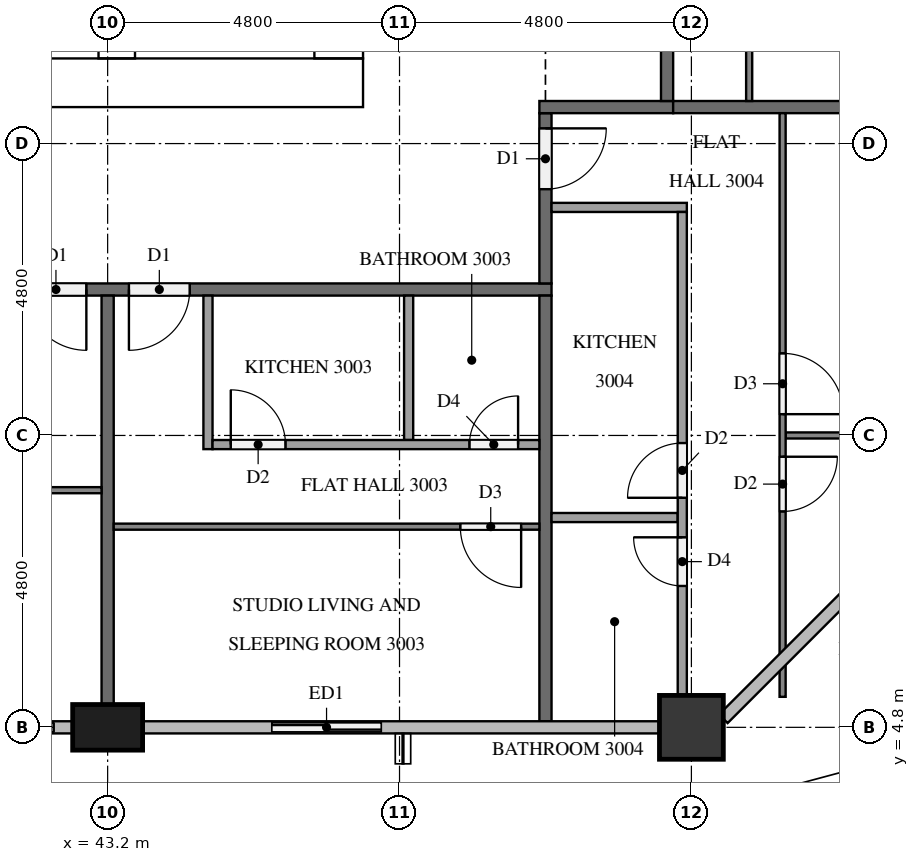
"""IFC4 building model, lengths in metres.
Left out: names, types, materials, properties, quantities, classifications, styles, units other than length and angle.
Written with IfcOpenShell. Run it as: python <this file> out.ifc"""

import sys

from ifc_helpers import new_model, si_unit, direction, frame, frame_2d, origin, origin_2d, place, context, subcontext, project, spatial, rectangle, extrude, element, fill, save


model = new_model("IFC4")
c1 = context("Model", 3, precision=1e-05, world=origin(), true_north=direction((0.0, 1.0)))
c2 = subcontext(c1, "Body", "Model", "MODEL_VIEW")
j1 = project(units=[si_unit("LENGTHUNIT", "METRE"), si_unit("PLANEANGLEUNIT", "RADIAN")], contexts=[c1])
p1 = place(None, origin())
s1 = spatial("IfcSite", under=j1, at=p1, CompositionType="ELEMENT")
p2 = place(p1, origin())
s2 = spatial("IfcBuilding", under=s1, at=p2, CompositionType="ELEMENT")
p3 = place(p2, frame((0.0, 0.0, 119.1)))
s3 = spatial("IfcBuildingStorey", under=s2, at=p3, CompositionType="ELEMENT", Elevation=119.1)
p4 = place(p3, frame((15.0, 15.4, 0.0), z_axis=(0.0, 0.0, 1.0), x_axis=(1.0, 0.0, 0.0)))
e1 = element("IfcWall", 1, at=p4, inside=s3, PredefinedType="SHEAR", context=c2, shape_type="SweptSolid", body=[
    extrude(rectangle(XDim=32.4, YDim=0.8, at=frame_2d((16.2, 0.0))), origin(), (0.0, 0.0, 1.0), 3.2),
])
p5 = place(p4, frame((15.3, 0.0, 0.0)))
e2 = element("IfcOpeningElement", 2, at=p5, cuts=e1, PredefinedType="OPENING", context=c2, shape_type="SweptSolid", body=[
    extrude(rectangle(XDim=1.8, YDim=2.1, at=frame_2d((0.9, 1.05))), frame((0.0, 0.41, 0.0), z_axis=(0.0, -1.0, 0.0), x_axis=(1.0, 0.0, 0.0)), (0.0, 0.0, 1.0), 0.82),
])
p6 = place(p3, frame((47.0, 15.8, 0.0), z_axis=(0.0, 0.0, 1.0), x_axis=(0.0, 1.0, 0.0)))
e3 = element("IfcWall", 3, at=p6, inside=s3, PredefinedType="SHEAR", context=c2, shape_type="SweptSolid", body=[
    extrude(rectangle(XDim=21.2, YDim=0.8, at=frame_2d((10.6, 0.0))), origin(), (0.0, 0.0, 1.0), 3.2),
])
p7 = place(p6, frame((10.3, 0.0, 0.0)))
e4 = element("IfcOpeningElement", 4, at=p7, cuts=e3, PredefinedType="OPENING", context=c2, shape_type="SweptSolid", body=[
    extrude(rectangle(XDim=1.2, YDim=2.1, at=frame_2d((0.6, 1.05))), frame((0.0, 0.41, 0.0), z_axis=(0.0, -1.0, 0.0), x_axis=(1.0, 0.0, 0.0)), (0.0, 0.0, 1.0), 0.82),
])
p8 = place(p3, frame((43.35, 15.8, 0.0), z_axis=(0.0, 0.0, 1.0), x_axis=(0.0, 1.0, 0.0)))
e5 = element("IfcWall", 5, at=p8, inside=s3, PredefinedType="SHEAR", context=c2, shape_type="SweptSolid", body=[
    extrude(rectangle(XDim=8.45, YDim=0.6, at=frame_2d((4.225, 0.0))), origin(), (0.0, 0.0, 1.0), 3.2),
])
p9 = place(p8, frame((0.4, 0.0, 0.0)))
e6 = element("IfcOpeningElement", 6, at=p9, cuts=e5, PredefinedType="OPENING", context=c2, shape_type="SweptSolid", body=[
    extrude(rectangle(XDim=1.2, YDim=2.1, at=frame_2d((0.6, 1.05))), frame((0.0, 0.31, 0.0), z_axis=(0.0, -1.0, 0.0), x_axis=(1.0, 0.0, 0.0)), (0.0, 0.0, 1.0), 0.62),
])
p10 = place(p3, frame((43.2, 4.8, 0.0), z_axis=(0.0, 0.0, 1.0), x_axis=(1.0, 0.0, 0.0)))
e7 = element("IfcColumn", 7, at=p10, inside=s3, PredefinedType="COLUMN", context=c2, shape_type="SweptSolid", body=[
    extrude(rectangle(XDim=1.15, YDim=0.75, at=origin_2d()), origin(), (0.0, 0.0, 1.0), 3.2),
])
p11 = place(p3, frame((52.8, 4.8, 0.0), z_axis=(0.0, 0.0, 1.0), x_axis=(1.0, 0.0, 0.0)))
e8 = element("IfcColumn", 8, at=p11, inside=s3, PredefinedType="COLUMN", context=c2, shape_type="SweptSolid", body=[
    extrude(rectangle(XDim=1.05, YDim=1.05, at=origin_2d()), origin(), (0.0, 0.0, 1.0), 3.2),
])
p12 = place(p3, frame((40.8, 4.8, 0.0), z_axis=(0.0, 0.0, 1.0), x_axis=(1.0, 0.0, 0.0)))
e9 = element("IfcWall", 9, at=p12, inside=s3, PredefinedType="SOLIDWALL", context=c2, shape_type="SweptSolid", body=[
    extrude(rectangle(XDim=1.825, YDim=0.15, at=frame_2d((0.913, 0.0))), origin(), (0.0, 0.0, 1.0), 3.2),
])
p13 = place(p12, frame((0.312, 0.0, 0.9)))
e10 = element("IfcOpeningElement", 10, at=p13, cuts=e9, PredefinedType="OPENING", context=c2, shape_type="SweptSolid", body=[
    extrude(rectangle(XDim=1.2, YDim=1.4, at=frame_2d((0.6, 0.7))), frame((0.0, 0.085, 0.0), z_axis=(0.0, -1.0, 0.0), x_axis=(1.0, 0.0, 0.0)), (0.0, 0.0, 1.0), 0.17),
])
p14 = place(p3, frame((45.6, 4.8, 0.0), z_axis=(0.0, 0.0, 1.0), x_axis=(1.0, 0.0, 0.0)))
e11 = element("IfcWall", 11, at=p14, inside=s3, PredefinedType="SOLIDWALL", context=c2, shape_type="SweptSolid", body=[
    extrude(rectangle(XDim=2.4, YDim=0.15, at=frame_2d((1.2, 0.0))), origin(), (0.0, 0.0, 1.0), 3.2),
])
p15 = place(p14, frame((0.3, 0.0, 0.0)))
e12 = element("IfcOpeningElement", 12, at=p15, cuts=e11, PredefinedType="OPENING", context=c2, shape_type="SweptSolid", body=[
    extrude(rectangle(XDim=1.8, YDim=2.4, at=frame_2d((0.9, 1.2))), frame((0.0, 0.085, 0.0), z_axis=(0.0, -1.0, 0.0), x_axis=(1.0, 0.0, 0.0)), (0.0, 0.0, 1.0), 0.17),
])
p16 = place(p3, frame((50.5, 12.0, 0.0), z_axis=(0.0, 0.0, 1.0), x_axis=(-1.0, 0.0, 0.0)))
e13 = element("IfcWall", 13, at=p16, inside=s3, PredefinedType="PARTITIONING", context=c2, shape_type="SweptSolid", body=[
    extrude(rectangle(XDim=38.6, YDim=0.2, at=frame_2d((19.3, 0.0))), origin(), (0.0, 0.0, 1.0), 3.2),
])
p17 = place(p16, frame((37.15, 0.0, 0.0)))
e14 = element("IfcOpeningElement", 14, at=p17, cuts=e13, PredefinedType="OPENING", context=c2, shape_type="SweptSolid", body=[
    extrude(rectangle(XDim=1.0, YDim=2.1, at=frame_2d((0.5, 1.05))), frame((0.0, 0.11, 0.0), z_axis=(0.0, -1.0, 0.0), x_axis=(1.0, 0.0, 0.0)), (0.0, 0.0, 1.0), 0.22),
])
p18 = place(p16, frame((7.65, 0.0, 0.0)))
e15 = element("IfcOpeningElement", 15, at=p18, cuts=e13, PredefinedType="OPENING", context=c2, shape_type="SweptSolid", body=[
    extrude(rectangle(XDim=1.0, YDim=2.1, at=frame_2d((0.5, 1.05))), frame((0.0, 0.11, 0.0), z_axis=(0.0, -1.0, 0.0), x_axis=(1.0, 0.0, 0.0)), (0.0, 0.0, 1.0), 0.22),
])
p19 = place(p16, frame((5.95, 0.0, 0.0)))
e16 = element("IfcOpeningElement", 16, at=p19, cuts=e13, PredefinedType="OPENING", context=c2, shape_type="SweptSolid", body=[
    extrude(rectangle(XDim=1.0, YDim=2.1, at=frame_2d((0.5, 1.05))), frame((0.0, 0.11, 0.0), z_axis=(0.0, -1.0, 0.0), x_axis=(1.0, 0.0, 0.0)), (0.0, 0.0, 1.0), 0.22),
])
p20 = place(p3, frame((50.4, 14.9, 0.0), z_axis=(0.0, 0.0, 1.0), x_axis=(0.0, -1.0, 0.0)))
e17 = element("IfcWall", 17, at=p20, inside=s3, PredefinedType="PARTITIONING", context=c2, shape_type="SweptSolid", body=[
    extrude(rectangle(XDim=2.8, YDim=0.2, at=frame_2d((1.4, 0.0))), origin(), (0.0, 0.0, 1.0), 3.2),
])
p21 = place(p20, frame((0.25, 0.0, 0.0)))
e18 = element("IfcOpeningElement", 18, at=p21, cuts=e17, PredefinedType="OPENING", context=c2, shape_type="SweptSolid", body=[
    extrude(rectangle(XDim=1.0, YDim=2.1, at=frame_2d((0.5, 1.05))), frame((0.0, 0.11, 0.0), z_axis=(0.0, -1.0, 0.0), x_axis=(1.0, 0.0, 0.0)), (0.0, 0.0, 1.0), 0.22),
])
p22 = place(p3, frame((50.3, 15.0, 0.0), z_axis=(0.0, 0.0, 1.0), x_axis=(1.0, 0.0, 0.0)))
e19 = element("IfcWall", 19, at=p22, inside=s3, PredefinedType="PARTITIONING", context=c2, shape_type="SweptSolid", body=[
    extrude(rectangle(XDim=2.2, YDim=0.2, at=frame_2d((1.1, 0.0))), origin(), (0.0, 0.0, 1.0), 3.2),
])
p23 = place(p3, frame((52.4, 37.7, 0.0), z_axis=(0.0, 0.0, 1.0), x_axis=(0.0, -1.0, 0.0)))
e20 = element("IfcWall", 20, at=p23, inside=s3, PredefinedType="PARTITIONING", context=c2, shape_type="SweptSolid", body=[
    extrude(rectangle(XDim=22.6, YDim=0.2, at=frame_2d((11.3, 0.0))), origin(), (0.0, 0.0, 1.0), 3.2),
])
p24 = place(p23, frame((0.25, 0.0, 0.0)))
e21 = element("IfcOpeningElement", 21, at=p24, cuts=e20, PredefinedType="OPENING", context=c2, shape_type="SweptSolid", body=[
    extrude(rectangle(XDim=1.0, YDim=2.1, at=frame_2d((0.5, 1.05))), frame((0.0, 0.11, 0.0), z_axis=(0.0, -1.0, 0.0), x_axis=(1.0, 0.0, 0.0)), (0.0, 0.0, 1.0), 0.22),
])
p25 = place(p3, frame((43.2, 11.9, 0.0), z_axis=(0.0, 0.0, 1.0), x_axis=(0.0, -1.0, 0.0)))
e22 = element("IfcWall", 22, at=p25, inside=s3, PredefinedType="PARTITIONING", context=c2, shape_type="SweptSolid", body=[
    extrude(rectangle(XDim=6.725, YDim=0.2, at=frame_2d((3.362, 0.0))), origin(), (0.0, 0.0, 1.0), 3.2),
])
p26 = place(p3, frame((50.4, 11.9, 0.0), z_axis=(0.0, 0.0, 1.0), x_axis=(0.0, -1.0, 0.0)))
e23 = element("IfcWall", 23, at=p26, inside=s3, PredefinedType="PARTITIONING", context=c2, shape_type="SweptSolid", body=[
    extrude(rectangle(XDim=7.0, YDim=0.2, at=frame_2d((3.5, 0.0))), origin(), (0.0, 0.0, 1.0), 3.2),
])
p27 = place(p3, frame((52.5, 15.0, 0.0), z_axis=(0.0, 0.0, 1.0), x_axis=(1.0, 0.0, 0.0)))
e24 = element("IfcWall", 24, at=p27, inside=s3, PredefinedType="PARTITIONING", context=c2, shape_type="SweptSolid", body=[
    extrude(rectangle(XDim=5.0, YDim=0.2, at=frame_2d((2.5, 0.0))), origin(), (0.0, 0.0, 1.0), 3.2),
])
p28 = place(p3, frame((43.1, 8.7, 0.0), z_axis=(0.0, 0.0, 1.0), x_axis=(-1.0, 0.0, 0.0)))
e25 = element("IfcWall", 25, at=p28, inside=s3, PredefinedType="PARTITIONING", context=c2, shape_type="SweptSolid", body=[
    extrude(rectangle(XDim=16.6, YDim=0.1, at=frame_2d((8.3, 0.0))), origin(), (0.0, 0.0, 1.0), 3.2),
])
p29 = place(p28, frame((3.45, 0.0, 0.0)))
e26 = element("IfcOpeningElement", 26, at=p29, cuts=e25, PredefinedType="OPENING", context=c2, shape_type="SweptSolid", body=[
    extrude(rectangle(XDim=0.9, YDim=2.1, at=frame_2d((0.45, 1.05))), frame((0.0, 0.06, 0.0), z_axis=(0.0, -1.0, 0.0), x_axis=(1.0, 0.0, 0.0)), (0.0, 0.0, 1.0), 0.12),
])
p30 = place(p28, frame((5.05, 0.0, 0.0)))
e27 = element("IfcOpeningElement", 27, at=p30, cuts=e25, PredefinedType="OPENING", context=c2, shape_type="SweptSolid", body=[
    extrude(rectangle(XDim=1.0, YDim=2.1, at=frame_2d((0.5, 1.05))), frame((0.0, 0.06, 0.0), z_axis=(0.0, -1.0, 0.0), x_axis=(1.0, 0.0, 0.0)), (0.0, 0.0, 1.0), 0.12),
])
p31 = place(p28, frame((15.4, 0.0, 0.0)))
e28 = element("IfcOpeningElement", 28, at=p31, cuts=e25, PredefinedType="OPENING", context=c2, shape_type="SweptSolid", body=[
    extrude(rectangle(XDim=0.9, YDim=2.1, at=frame_2d((0.45, 1.05))), frame((0.0, 0.06, 0.0), z_axis=(0.0, -1.0, 0.0), x_axis=(1.0, 0.0, 0.0)), (0.0, 0.0, 1.0), 0.12),
])
p32 = place(p3, frame((50.3, 8.1, 0.0), z_axis=(0.0, 0.0, 1.0), x_axis=(-1.0, 0.0, 0.0)))
e29 = element("IfcWall", 29, at=p32, inside=s3, PredefinedType="PARTITIONING", context=c2, shape_type="SweptSolid", body=[
    extrude(rectangle(XDim=7.0, YDim=0.1, at=frame_2d((3.5, 0.0))), origin(), (0.0, 0.0, 1.0), 3.2),
])
p33 = place(p32, frame((0.3, 0.0, 0.0)))
e30 = element("IfcOpeningElement", 30, at=p33, cuts=e29, PredefinedType="OPENING", context=c2, shape_type="SweptSolid", body=[
    extrude(rectangle(XDim=1.0, YDim=2.1, at=frame_2d((0.5, 1.05))), frame((0.0, 0.06, 0.0), z_axis=(0.0, -1.0, 0.0), x_axis=(1.0, 0.0, 0.0)), (0.0, 0.0, 1.0), 0.12),
])
p34 = place(p3, frame((48.15, 11.9, 0.0), z_axis=(0.0, 0.0, 1.0), x_axis=(0.0, -1.0, 0.0)))
e31 = element("IfcWall", 31, at=p34, inside=s3, PredefinedType="PARTITIONING", context=c2, shape_type="SweptSolid", body=[
    extrude(rectangle(XDim=2.375, YDim=0.15, at=frame_2d((1.188, 0.0))), origin(), (0.0, 0.0, 1.0), 3.2),
])
p35 = place(p3, frame((44.85, 11.9, 0.0), z_axis=(0.0, 0.0, 1.0), x_axis=(0.0, -1.0, 0.0)))
e32 = element("IfcWall", 32, at=p35, inside=s3, PredefinedType="PARTITIONING", context=c2, shape_type="SweptSolid", body=[
    extrude(rectangle(XDim=2.525, YDim=0.15, at=frame_2d((1.262, 0.0))), origin(), (0.0, 0.0, 1.0), 3.2),
])
p36 = place(p3, frame((44.925, 9.45, 0.0), z_axis=(0.0, 0.0, 1.0), x_axis=(1.0, 0.0, 0.0)))
e33 = element("IfcWall", 33, at=p36, inside=s3, PredefinedType="PARTITIONING", context=c2, shape_type="SweptSolid", body=[
    extrude(rectangle(XDim=5.375, YDim=0.15, at=frame_2d((2.688, 0.0))), origin(), (0.0, 0.0, 1.0), 3.2),
])
p37 = place(p36, frame((0.3, 0.0, 0.0)))
e34 = element("IfcOpeningElement", 34, at=p37, cuts=e33, PredefinedType="OPENING", context=c2, shape_type="SweptSolid", body=[
    extrude(rectangle(XDim=0.9, YDim=2.1, at=frame_2d((0.45, 1.05))), frame((0.0, 0.085, 0.0), z_axis=(0.0, -1.0, 0.0), x_axis=(1.0, 0.0, 0.0)), (0.0, 0.0, 1.0), 0.17),
])
p38 = place(p36, frame((4.225, 0.0, 0.0)))
e35 = element("IfcOpeningElement", 35, at=p38, cuts=e33, PredefinedType="OPENING", context=c2, shape_type="SweptSolid", body=[
    extrude(rectangle(XDim=0.8, YDim=2.1, at=frame_2d((0.4, 1.05))), frame((0.0, 0.085, 0.0), z_axis=(0.0, -1.0, 0.0), x_axis=(1.0, 0.0, 0.0)), (0.0, 0.0, 1.0), 0.17),
])
p39 = place(p3, frame((54.35, 9.6, 0.0), z_axis=(0.0, 0.0, 1.0), x_axis=(1.0, 0.0, 0.0)))
e36 = element("IfcWall", 36, at=p39, inside=s3, PredefinedType="PARTITIONING", context=c2, shape_type="SweptSolid", body=[
    extrude(rectangle(XDim=2.725, YDim=0.1, at=frame_2d((1.362, 0.0))), origin(), (0.0, 0.0, 1.0), 3.2),
])
p40 = place(p3, frame((54.3, 14.9, 0.0), z_axis=(0.0, 0.0, 1.0), x_axis=(0.0, -1.0, 0.0)))
e37 = element("IfcWall", 37, at=p40, inside=s3, PredefinedType="PARTITIONING", context=c2, shape_type="SweptSolid", body=[
    extrude(rectangle(XDim=9.598, YDim=0.1, at=frame_2d((4.799, 0.0))), origin(), (0.0, 0.0, 1.0), 3.2),
])
p41 = place(p40, frame((3.95, 0.0, 0.0)))
e38 = element("IfcOpeningElement", 38, at=p41, cuts=e37, PredefinedType="OPENING", context=c2, shape_type="SweptSolid", body=[
    extrude(rectangle(XDim=1.0, YDim=2.1, at=frame_2d((0.5, 1.05))), frame((0.0, 0.06, 0.0), z_axis=(0.0, -1.0, 0.0), x_axis=(1.0, 0.0, 0.0)), (0.0, 0.0, 1.0), 0.12),
])
p42 = place(p40, frame((5.65, 0.0, 0.0)))
e39 = element("IfcOpeningElement", 39, at=p42, cuts=e37, PredefinedType="OPENING", context=c2, shape_type="SweptSolid", body=[
    extrude(rectangle(XDim=0.9, YDim=2.1, at=frame_2d((0.45, 1.05))), frame((0.0, 0.06, 0.0), z_axis=(0.0, -1.0, 0.0), x_axis=(1.0, 0.0, 0.0)), (0.0, 0.0, 1.0), 0.12),
])
p43 = place(p3, frame((50.5, 8.25, 0.0), z_axis=(0.0, 0.0, 1.0), x_axis=(1.0, 0.0, 0.0)))
e40 = element("IfcWall", 40, at=p43, inside=s3, PredefinedType="PARTITIONING", context=c2, shape_type="SweptSolid", body=[
    extrude(rectangle(XDim=2.075, YDim=0.15, at=frame_2d((1.038, 0.0))), origin(), (0.0, 0.0, 1.0), 3.2),
])
p44 = place(p3, frame((50.5, 13.35, 0.0), z_axis=(0.0, 0.0, 1.0), x_axis=(1.0, 0.0, 0.0)))
e41 = element("IfcWall", 41, at=p44, inside=s3, PredefinedType="PARTITIONING", context=c2, shape_type="SweptSolid", body=[
    extrude(rectangle(XDim=2.225, YDim=0.15, at=frame_2d((1.113, 0.0))), origin(), (0.0, 0.0, 1.0), 3.2),
])
p45 = place(p3, frame((52.65, 5.325, 0.0), z_axis=(0.0, 0.0, 1.0), x_axis=(0.0, 1.0, 0.0)))
e42 = element("IfcWall", 42, at=p45, inside=s3, PredefinedType="PARTITIONING", context=c2, shape_type="SweptSolid", body=[
    extrude(rectangle(XDim=7.95, YDim=0.15, at=frame_2d((3.975, 0.0))), origin(), (0.0, 0.0, 1.0), 3.2),
])
p46 = place(p45, frame((3.25, 0.0, 0.0)))
e43 = element("IfcOpeningElement", 43, at=p46, cuts=e42, PredefinedType="OPENING", context=c2, shape_type="SweptSolid", body=[
    extrude(rectangle(XDim=0.9, YDim=2.1, at=frame_2d((0.45, 1.05))), frame((0.0, 0.085, 0.0), z_axis=(0.0, -1.0, 0.0), x_axis=(1.0, 0.0, 0.0)), (0.0, 0.0, 1.0), 0.17),
])
p47 = place(p45, frame((1.8, 0.0, 0.0)))
e44 = element("IfcOpeningElement", 44, at=p47, cuts=e42, PredefinedType="OPENING", context=c2, shape_type="SweptSolid", body=[
    extrude(rectangle(XDim=0.8, YDim=2.1, at=frame_2d((0.4, 1.05))), frame((0.0, 0.085, 0.0), z_axis=(0.0, -1.0, 0.0), x_axis=(1.0, 0.0, 0.0)), (0.0, 0.0, 1.0), 0.17),
])
p48 = place(p3, frame((53.75, 37.7, 0.0), z_axis=(0.0, 0.0, 1.0), x_axis=(0.0, -1.0, 0.0)))
e45 = element("IfcWall", 45, at=p48, inside=s3, PredefinedType="PARTITIONING", context=c2, shape_type="SweptSolid", body=[
    extrude(rectangle(XDim=22.6, YDim=0.1, at=frame_2d((11.3, 0.0))), origin(), (0.0, 0.0, 1.0), 3.2),
])
p49 = place(p48, frame((2.85, 0.0, 0.0)))
e46 = element("IfcOpeningElement", 46, at=p49, cuts=e45, PredefinedType="OPENING", context=c2, shape_type="SweptSolid", body=[
    extrude(rectangle(XDim=0.9, YDim=2.1, at=frame_2d((0.45, 1.05))), frame((0.0, 0.06, 0.0), z_axis=(0.0, -1.0, 0.0), x_axis=(1.0, 0.0, 0.0)), (0.0, 0.0, 1.0), 0.12),
])
p50 = place(p48, frame((4.45, 0.0, 0.0)))
e47 = element("IfcOpeningElement", 47, at=p50, cuts=e45, PredefinedType="OPENING", context=c2, shape_type="SweptSolid", body=[
    extrude(rectangle(XDim=0.8, YDim=2.1, at=frame_2d((0.4, 1.05))), frame((0.0, 0.06, 0.0), z_axis=(0.0, -1.0, 0.0), x_axis=(1.0, 0.0, 0.0)), (0.0, 0.0, 1.0), 0.12),
])
p51 = place(p48, frame((7.65, 0.0, 0.0)))
e48 = element("IfcOpeningElement", 48, at=p51, cuts=e45, PredefinedType="OPENING", context=c2, shape_type="SweptSolid", body=[
    extrude(rectangle(XDim=0.9, YDim=2.1, at=frame_2d((0.45, 1.05))), frame((0.0, 0.06, 0.0), z_axis=(0.0, -1.0, 0.0), x_axis=(1.0, 0.0, 0.0)), (0.0, 0.0, 1.0), 0.12),
])
p52 = place(p48, frame((9.25, 0.0, 0.0)))
e49 = element("IfcOpeningElement", 49, at=p52, cuts=e45, PredefinedType="OPENING", context=c2, shape_type="SweptSolid", body=[
    extrude(rectangle(XDim=0.9, YDim=2.1, at=frame_2d((0.45, 1.05))), frame((0.0, 0.06, 0.0), z_axis=(0.0, -1.0, 0.0), x_axis=(1.0, 0.0, 0.0)), (0.0, 0.0, 1.0), 0.12),
])
p53 = place(p48, frame((17.15, 0.0, 0.0)))
e50 = element("IfcOpeningElement", 50, at=p53, cuts=e45, PredefinedType="OPENING", context=c2, shape_type="SweptSolid", body=[
    extrude(rectangle(XDim=1.0, YDim=2.1, at=frame_2d((0.5, 1.05))), frame((0.0, 0.06, 0.0), z_axis=(0.0, -1.0, 0.0), x_axis=(1.0, 0.0, 0.0)), (0.0, 0.0, 1.0), 0.12),
])
p54 = place(p48, frame((18.85, 0.0, 0.0)))
e51 = element("IfcOpeningElement", 51, at=p54, cuts=e45, PredefinedType="OPENING", context=c2, shape_type="SweptSolid", body=[
    extrude(rectangle(XDim=0.9, YDim=2.1, at=frame_2d((0.45, 1.05))), frame((0.0, 0.06, 0.0), z_axis=(0.0, -1.0, 0.0), x_axis=(1.0, 0.0, 0.0)), (0.0, 0.0, 1.0), 0.12),
])
p55 = place(p13, origin())
e52 = element("IfcWindow", 52, at=p55, inside=s3, PartitioningType="SINGLE_PANEL", PredefinedType="WINDOW", context=c2, shape_type="SweptSolid", body=[
    extrude(rectangle(XDim=1.2, YDim=1.4, at=frame_2d((0.6, 0.7))), frame((0.0, 0.03, 0.0), z_axis=(0.0, -1.0, 0.0), x_axis=(1.0, 0.0, 0.0)), (0.0, 0.0, 1.0), 0.06),
])
fill(e10, e52)
p56 = place(p15, origin())
e53 = element("IfcDoor", 53, at=p56, inside=s3, OperationType="SLIDING_TO_RIGHT", PredefinedType="DOOR", context=c2, shape_type="SweptSolid", body=[
    extrude(rectangle(XDim=1.8, YDim=2.4, at=frame_2d((0.9, 1.2))), frame((0.0, 0.025, 0.0), z_axis=(0.0, -1.0, 0.0), x_axis=(1.0, 0.0, 0.0)), (0.0, 0.0, 1.0), 0.05),
])
fill(e12, e53)
p57 = place(p18, origin())
e54 = element("IfcDoor", 54, at=p57, inside=s3, OperationType="SINGLE_SWING_LEFT", PredefinedType="DOOR", context=c2, shape_type="SweptSolid", body=[
    extrude(rectangle(XDim=1.0, YDim=2.1, at=frame_2d((0.5, 1.05))), frame((0.0, 0.025, 0.0), z_axis=(0.0, -1.0, 0.0), x_axis=(1.0, 0.0, 0.0)), (0.0, 0.0, 1.0), 0.05),
])
fill(e15, e54)
p58 = place(p19, origin())
e55 = element("IfcDoor", 55, at=p58, inside=s3, OperationType="SINGLE_SWING_RIGHT", PredefinedType="DOOR", context=c2, shape_type="SweptSolid", body=[
    extrude(rectangle(XDim=1.0, YDim=2.1, at=frame_2d((0.5, 1.05))), frame((0.0, 0.025, 0.0), z_axis=(0.0, -1.0, 0.0), x_axis=(1.0, 0.0, 0.0)), (0.0, 0.0, 1.0), 0.05),
])
fill(e16, e55)
p59 = place(p21, origin())
e56 = element("IfcDoor", 56, at=p59, inside=s3, OperationType="SINGLE_SWING_LEFT", PredefinedType="DOOR", context=c2, shape_type="SweptSolid", body=[
    extrude(rectangle(XDim=1.0, YDim=2.1, at=frame_2d((0.5, 1.05))), frame((0.0, 0.025, 0.0), z_axis=(0.0, -1.0, 0.0), x_axis=(1.0, 0.0, 0.0)), (0.0, 0.0, 1.0), 0.05),
])
fill(e18, e56)
p60 = place(p33, origin())
e57 = element("IfcDoor", 57, at=p60, inside=s3, OperationType="SINGLE_SWING_LEFT", PredefinedType="DOOR", context=c2, shape_type="SweptSolid", body=[
    extrude(rectangle(XDim=1.0, YDim=2.1, at=frame_2d((0.5, 1.05))), frame((0.0, 0.025, 0.0), z_axis=(0.0, -1.0, 0.0), x_axis=(1.0, 0.0, 0.0)), (0.0, 0.0, 1.0), 0.05),
])
fill(e30, e57)
p61 = place(p37, origin())
e58 = element("IfcDoor", 58, at=p61, inside=s3, OperationType="SINGLE_SWING_LEFT", PredefinedType="DOOR", context=c2, shape_type="SweptSolid", body=[
    extrude(rectangle(XDim=0.9, YDim=2.1, at=frame_2d((0.45, 1.05))), frame((0.0, 0.025, 0.0), z_axis=(0.0, -1.0, 0.0), x_axis=(1.0, 0.0, 0.0)), (0.0, 0.0, 1.0), 0.05),
])
fill(e34, e58)
p62 = place(p38, origin())
e59 = element("IfcDoor", 59, at=p62, inside=s3, OperationType="SINGLE_SWING_RIGHT", PredefinedType="DOOR", context=c2, shape_type="SweptSolid", body=[
    extrude(rectangle(XDim=0.8, YDim=2.1, at=frame_2d((0.4, 1.05))), frame((0.0, 0.025, 0.0), z_axis=(0.0, -1.0, 0.0), x_axis=(1.0, 0.0, 0.0)), (0.0, 0.0, 1.0), 0.05),
])
fill(e35, e59)
p63 = place(p41, origin())
e60 = element("IfcDoor", 60, at=p63, inside=s3, OperationType="SINGLE_SWING_RIGHT", PredefinedType="DOOR", context=c2, shape_type="SweptSolid", body=[
    extrude(rectangle(XDim=1.0, YDim=2.1, at=frame_2d((0.5, 1.05))), frame((0.0, 0.025, 0.0), z_axis=(0.0, -1.0, 0.0), x_axis=(1.0, 0.0, 0.0)), (0.0, 0.0, 1.0), 0.05),
])
fill(e38, e60)
p64 = place(p42, origin())
e61 = element("IfcDoor", 61, at=p64, inside=s3, OperationType="SINGLE_SWING_LEFT", PredefinedType="DOOR", context=c2, shape_type="SweptSolid", body=[
    extrude(rectangle(XDim=0.9, YDim=2.1, at=frame_2d((0.45, 1.05))), frame((0.0, 0.025, 0.0), z_axis=(0.0, -1.0, 0.0), x_axis=(1.0, 0.0, 0.0)), (0.0, 0.0, 1.0), 0.05),
])
fill(e39, e61)
p65 = place(p46, origin())
e62 = element("IfcDoor", 62, at=p65, inside=s3, OperationType="SINGLE_SWING_LEFT", PredefinedType="DOOR", context=c2, shape_type="SweptSolid", body=[
    extrude(rectangle(XDim=0.9, YDim=2.1, at=frame_2d((0.45, 1.05))), frame((0.0, 0.025, 0.0), z_axis=(0.0, -1.0, 0.0), x_axis=(1.0, 0.0, 0.0)), (0.0, 0.0, 1.0), 0.05),
])
fill(e43, e62)
p66 = place(p47, origin())
e63 = element("IfcDoor", 63, at=p66, inside=s3, OperationType="SINGLE_SWING_RIGHT", PredefinedType="DOOR", context=c2, shape_type="SweptSolid", body=[
    extrude(rectangle(XDim=0.8, YDim=2.1, at=frame_2d((0.4, 1.05))), frame((0.0, 0.025, 0.0), z_axis=(0.0, -1.0, 0.0), x_axis=(1.0, 0.0, 0.0)), (0.0, 0.0, 1.0), 0.05),
])
fill(e44, e63)
save(model, sys.argv[1])
